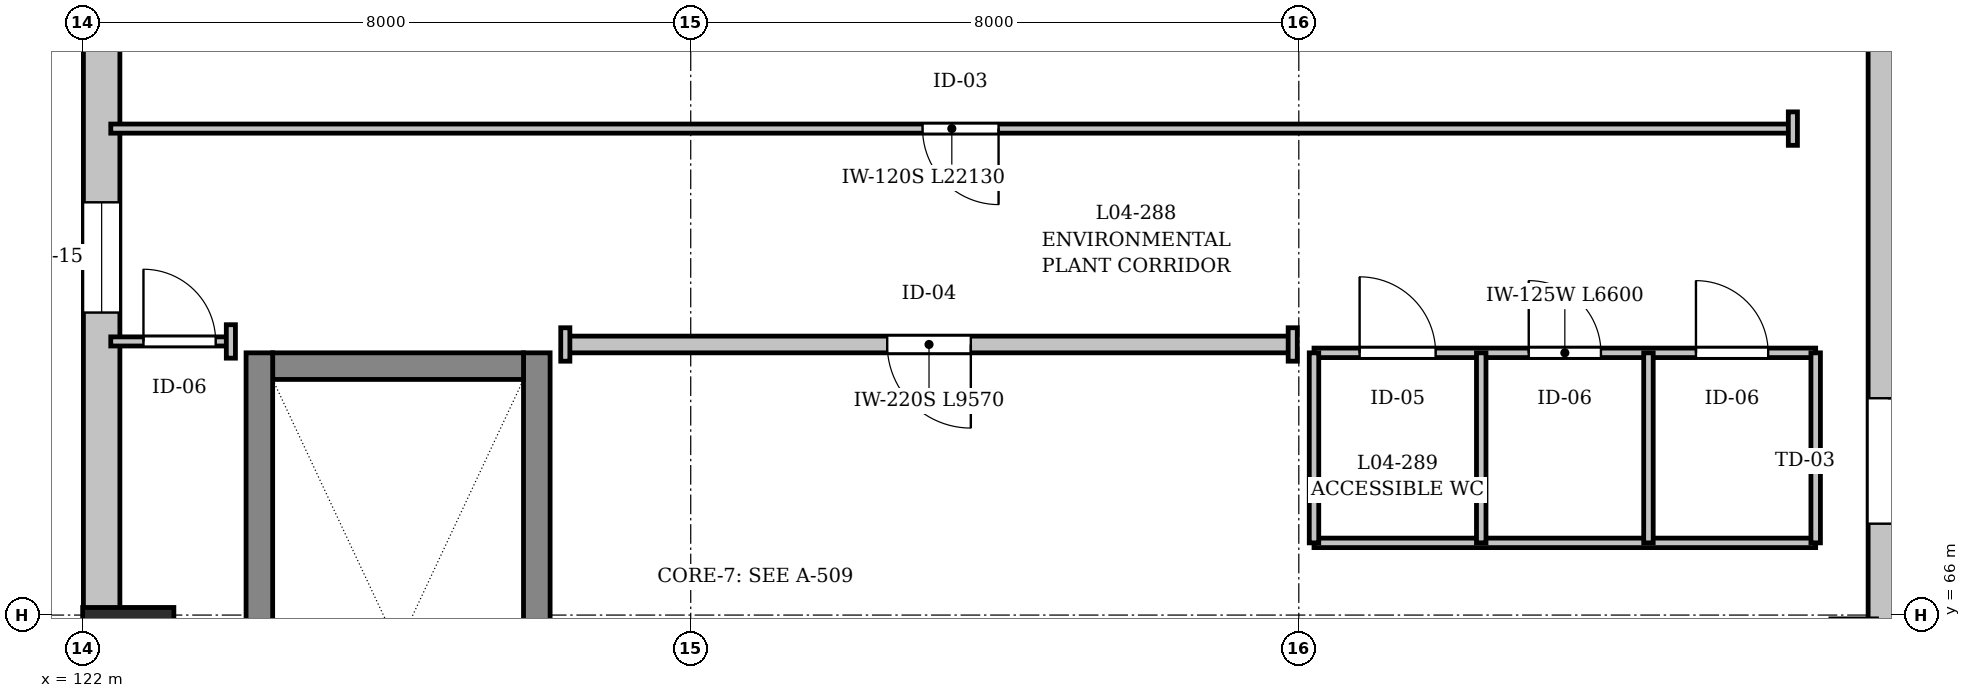
"""IFC4 building model, lengths in metres.
Left out: names, types, materials, properties, quantities, classifications, styles, units other than length and angle.
Written with IfcOpenShell. Run it as: python <this file> out.ifc"""

import sys

from ifc_helpers import new_model, si_unit, direction, frame, frame_2d, origin, origin_2d, place, context, subcontext, project, spatial, rectangle, extrude, element, fill, save


model = new_model("IFC4")
c1 = context("Model", 3, precision=1e-05, world=origin(), true_north=direction((0.0, 1.0)))
c2 = subcontext(c1, "Body", "Model", "MODEL_VIEW")
j1 = project(units=[si_unit("LENGTHUNIT", "METRE"), si_unit("PLANEANGLEUNIT", "RADIAN")], contexts=[c1])
p1 = place(None, origin())
s1 = spatial("IfcSite", under=j1, at=p1, CompositionType="ELEMENT")
p2 = place(p1, origin())
s2 = spatial("IfcBuilding", under=s1, at=p2, CompositionType="ELEMENT")
p3 = place(p2, frame((0.0, 0.0, 15.0)))
s3 = spatial("IfcBuildingStorey", under=s2, at=p3, CompositionType="ELEMENT", Elevation=15.0)
p4 = place(p3, frame((122.6, 65.5, 0.0), z_axis=(0.0, 0.0, 1.0), x_axis=(1.0, 0.0, 0.0)))
e1 = element("IfcColumn", 1, at=p4, inside=s3, PredefinedType="COLUMN", context=c2, shape_type="SweptSolid", body=[
    extrude(rectangle(XDim=1.2, YDim=1.2, at=origin_2d()), origin(), (0.0, 0.0, 1.0), 4.54),
])
p5 = place(p3, frame((122.25, 66.07, 0.0), z_axis=(0.0, 0.0, 1.0), x_axis=(0.0, 1.0, 0.0)))
e2 = element("IfcWall", 2, at=p5, inside=s3, PredefinedType="SOLIDWALL", context=c2, shape_type="SweptSolid", body=[
    extrude(rectangle(XDim=7.71, YDim=0.48, at=frame_2d((3.855, 0.0))), origin(), (0.0, 0.0, 1.0), 4.54),
])
p6 = place(p5, frame((3.91, 0.0, 0.9)))
e3 = element("IfcOpeningElement", 3, at=p6, cuts=e2, PredefinedType="OPENING", context=c2, shape_type="SweptSolid", body=[
    extrude(rectangle(XDim=1.45, YDim=1.5, at=frame_2d((0.725, 0.75))), frame((0.0, 0.25, 0.0), z_axis=(0.0, -1.0, 0.0), x_axis=(1.0, 0.0, 0.0)), (0.0, 0.0, 1.0), 0.5),
])
p7 = place(p3, frame((145.75, 74.75, 0.0), z_axis=(0.0, 0.0, 1.0), x_axis=(0.0, -1.0, 0.0)))
e4 = element("IfcWall", 4, at=p7, inside=s3, PredefinedType="SOLIDWALL", context=c2, shape_type="SweptSolid", body=[
    extrude(rectangle(XDim=18.5, YDim=0.52, at=frame_2d((9.25, 0.0))), origin(), (0.0, 0.0, 1.0), 4.54),
])
p8 = place(p7, frame((5.897, 0.0, 0.0)))
e5 = element("IfcOpeningElement", 5, at=p8, cuts=e4, PredefinedType="OPENING", context=c2, shape_type="SweptSolid", body=[
    extrude(rectangle(XDim=1.65, YDim=2.4, at=frame_2d((0.825, 1.2))), frame((0.0, 0.27, 0.0), z_axis=(0.0, -1.0, 0.0), x_axis=(1.0, 0.0, 0.0)), (0.0, 0.0, 1.0), 0.54),
])
p9 = place(p3, frame((127.975, 60.15, 0.0), z_axis=(0.0, 0.0, 1.0), x_axis=(0.0, 1.0, 0.0)))
e6 = element("IfcWall", 6, at=p9, inside=s3, PredefinedType="SHEAR", context=c2, shape_type="SweptSolid", body=[
    extrude(rectangle(XDim=9.3, YDim=0.35, at=frame_2d((4.65, 0.0))), origin(), (0.0, 0.0, 1.0), 3.6),
])
p10 = place(p3, frame((127.8, 69.275, 0.0), z_axis=(0.0, 0.0, 1.0), x_axis=(-1.0, 0.0, 0.0)))
e7 = element("IfcWall", 7, at=p10, inside=s3, PredefinedType="SHEAR", context=c2, shape_type="SweptSolid", body=[
    extrude(rectangle(XDim=3.3, YDim=0.35, at=frame_2d((1.65, 0.0))), origin(), (0.0, 0.0, 1.0), 3.6),
])
p11 = place(p3, frame((124.325, 69.45, 0.0), z_axis=(0.0, 0.0, 1.0), x_axis=(0.0, -1.0, 0.0)))
e8 = element("IfcWall", 8, at=p11, inside=s3, PredefinedType="SHEAR", context=c2, shape_type="SweptSolid", body=[
    extrude(rectangle(XDim=9.3, YDim=0.35, at=frame_2d((4.65, 0.0))), origin(), (0.0, 0.0, 1.0), 3.6),
])
p12 = place(p3, frame((138.2, 69.45, 0.0), z_axis=(0.0, 0.0, 1.0), x_axis=(1.0, 0.0, 0.0)))
e9 = element("IfcWall", 9, at=p12, inside=s3, PredefinedType="PARTITIONING", context=c2, shape_type="SweptSolid", body=[
    extrude(rectangle(XDim=6.6, YDim=0.125, at=frame_2d((3.3, 0.0))), origin(), (0.0, 0.0, 1.0), 3.55),
])
p13 = place(p12, frame((0.6, 0.0, 0.0)))
e10 = element("IfcOpeningElement", 10, at=p13, cuts=e9, PredefinedType="OPENING", context=c2, shape_type="SweptSolid", body=[
    extrude(rectangle(XDim=1.0, YDim=2.2, at=frame_2d((0.5, 1.1))), frame((0.0, 0.073, 0.0), z_axis=(0.0, -1.0, 0.0), x_axis=(1.0, 0.0, 0.0)), (0.0, 0.0, 1.0), 0.145),
])
p14 = place(p12, frame((2.825, 0.0, 0.0)))
e11 = element("IfcOpeningElement", 11, at=p14, cuts=e9, PredefinedType="OPENING", context=c2, shape_type="SweptSolid", body=[
    extrude(rectangle(XDim=0.95, YDim=2.2, at=frame_2d((0.475, 1.1))), frame((0.0, 0.073, 0.0), z_axis=(0.0, -1.0, 0.0), x_axis=(1.0, 0.0, 0.0)), (0.0, 0.0, 1.0), 0.145),
])
p15 = place(p12, frame((5.025, 0.0, 0.0)))
e12 = element("IfcOpeningElement", 12, at=p15, cuts=e9, PredefinedType="OPENING", context=c2, shape_type="SweptSolid", body=[
    extrude(rectangle(XDim=0.95, YDim=2.2, at=frame_2d((0.475, 1.1))), frame((0.0, 0.073, 0.0), z_axis=(0.0, -1.0, 0.0), x_axis=(1.0, 0.0, 0.0)), (0.0, 0.0, 1.0), 0.145),
])
p16 = place(p3, frame((138.2, 66.95, 0.0), z_axis=(0.0, 0.0, 1.0), x_axis=(1.0, 0.0, 0.0)))
e13 = element("IfcWall", 13, at=p16, inside=s3, PredefinedType="PARTITIONING", context=c2, shape_type="SweptSolid", body=[
    extrude(rectangle(XDim=6.6, YDim=0.125, at=frame_2d((3.3, 0.0))), origin(), (0.0, 0.0, 1.0), 3.55),
])
for number, where, z_axis, x_axis in (
    (14, (138.2, 66.95, 0.0), (0.0, 0.0, 1.0), (0.0, 1.0, 0.0)),
    (15, (144.8, 66.95, 0.0), (0.0, 0.0, 1.0), (0.0, 1.0, 0.0)),
    (16, (140.4, 66.95, 0.0), (0.0, 0.0, 1.0), (0.0, 1.0, 0.0)),
    (17, (142.6, 66.95, 0.0), (0.0, 0.0, 1.0), (0.0, 1.0, 0.0)),
):
    element("IfcWall", number, at=place(p3, frame(where, z_axis=z_axis, x_axis=x_axis)), inside=s3, PredefinedType="PARTITIONING", context=c2, shape_type="SweptSolid", body=[
        extrude(rectangle(XDim=2.5, YDim=0.125, at=frame_2d((1.25, 0.0))), origin(), (0.0, 0.0, 1.0), 3.55),
    ])
p17 = place(p3, frame((144.5, 72.4, 0.0), z_axis=(0.0, 0.0, 1.0), x_axis=(-1.0, 0.0, 0.0)))
e18 = element("IfcWall", 18, at=p17, inside=s3, PredefinedType="PARTITIONING", context=c2, shape_type="SweptSolid", body=[
    extrude(rectangle(XDim=22.13, YDim=0.12, at=frame_2d((11.065, 0.0))), origin(), (0.0, 0.0, 1.0), 3.55),
])
p18 = place(p17, frame((10.45, 0.0, 0.0)))
e19 = element("IfcOpeningElement", 19, at=p18, cuts=e18, PredefinedType="OPENING", context=c2, shape_type="SweptSolid", body=[
    extrude(rectangle(XDim=1.0, YDim=2.2, at=frame_2d((0.5, 1.1))), frame((0.0, 0.07, 0.0), z_axis=(0.0, -1.0, 0.0), x_axis=(1.0, 0.0, 0.0)), (0.0, 0.0, 1.0), 0.14),
])
p19 = place(p3, frame((122.37, 69.6, 0.0), z_axis=(0.0, 0.0, 1.0), x_axis=(1.0, 0.0, 0.0)))
e20 = element("IfcWall", 20, at=p19, inside=s3, PredefinedType="PARTITIONING", context=c2, shape_type="SweptSolid", body=[
    extrude(rectangle(XDim=1.58, YDim=0.12, at=frame_2d((0.79, 0.0))), origin(), (0.0, 0.0, 1.0), 3.55),
])
p20 = place(p19, frame((0.43, 0.0, 0.0)))
e21 = element("IfcOpeningElement", 21, at=p20, cuts=e20, PredefinedType="OPENING", context=c2, shape_type="SweptSolid", body=[
    extrude(rectangle(XDim=0.95, YDim=2.2, at=frame_2d((0.475, 1.1))), frame((0.0, 0.07, 0.0), z_axis=(0.0, -1.0, 0.0), x_axis=(1.0, 0.0, 0.0)), (0.0, 0.0, 1.0), 0.14),
])
p21 = place(p3, frame((137.92, 69.56, 0.0), z_axis=(0.0, 0.0, 1.0), x_axis=(-1.0, 0.0, 0.0)))
e22 = element("IfcWall", 22, at=p21, inside=s3, PredefinedType="SOLIDWALL", context=c2, shape_type="SweptSolid", body=[
    extrude(rectangle(XDim=9.57, YDim=0.22, at=frame_2d((4.785, 0.0))), origin(), (0.0, 0.0, 1.0), 3.55),
])
p22 = place(p21, frame((4.235, 0.0, 0.0)))
e23 = element("IfcOpeningElement", 23, at=p22, cuts=e22, PredefinedType="OPENING", context=c2, shape_type="SweptSolid", body=[
    extrude(rectangle(XDim=1.1, YDim=2.2, at=frame_2d((0.55, 1.1))), frame((0.0, 0.12, 0.0), z_axis=(0.0, -1.0, 0.0), x_axis=(1.0, 0.0, 0.0)), (0.0, 0.0, 1.0), 0.24),
])
for number, where, z_axis, x_axis in (
    (24, (144.5, 72.62, 0.0), (0.0, 0.0, 1.0), (0.0, -1.0, 0.0)),
    (25, (123.95, 69.38, 0.0), (0.0, 0.0, 1.0), (0.0, 1.0, 0.0)),
):
    element("IfcWall", number, at=place(p3, frame(where, z_axis=z_axis, x_axis=x_axis)), inside=s3, PredefinedType="PARTITIONING", context=c2, shape_type="SweptSolid", body=[
        extrude(rectangle(XDim=0.44, YDim=0.12, at=frame_2d((0.22, 0.0))), origin(), (0.0, 0.0, 1.0), 3.55),
    ])
for number, where, z_axis, x_axis in (
    (26, (137.92, 69.78, 0.0), (0.0, 0.0, 1.0), (0.0, -1.0, 0.0)),
    (27, (128.35, 69.78, 0.0), (0.0, 0.0, 1.0), (0.0, -1.0, 0.0)),
):
    element("IfcWall", number, at=place(p3, frame(where, z_axis=z_axis, x_axis=x_axis)), inside=s3, PredefinedType="PARTITIONING", context=c2, shape_type="SweptSolid", body=[
        extrude(rectangle(XDim=0.44, YDim=0.12, at=frame_2d((0.22, 0.0))), origin(), (0.0, 0.0, 1.0), 3.55),
    ])
p23 = place(p6, origin())
e28 = element("IfcWindow", 28, at=p23, inside=s3, PartitioningType="DOUBLE_PANEL_VERTICAL", PredefinedType="WINDOW", context=c2, shape_type="SweptSolid", body=[
    extrude(rectangle(XDim=1.45, YDim=1.5, at=frame_2d((0.725, 0.75))), frame((0.0, 0.03, 0.0), z_axis=(0.0, -1.0, 0.0), x_axis=(1.0, 0.0, 0.0)), (0.0, 0.0, 1.0), 0.06),
])
fill(e3, e28)
p24 = place(p8, origin())
e29 = element("IfcDoor", 29, at=p24, inside=s3, OperationType="DOUBLE_DOOR_SINGLE_SWING", PredefinedType="DOOR", context=c2, shape_type="SweptSolid", body=[
    extrude(rectangle(XDim=1.65, YDim=2.4, at=frame_2d((0.825, 1.2))), frame((0.0, 0.025, 0.0), z_axis=(0.0, -1.0, 0.0), x_axis=(1.0, 0.0, 0.0)), (0.0, 0.0, 1.0), 0.05),
])
fill(e5, e29)
p25 = place(p13, origin())
e30 = element("IfcDoor", 30, at=p25, inside=s3, OperationType="SINGLE_SWING_LEFT", PredefinedType="DOOR", context=c2, shape_type="SweptSolid", body=[
    extrude(rectangle(XDim=1.0, YDim=2.2, at=frame_2d((0.5, 1.1))), frame((0.0, 0.025, 0.0), z_axis=(0.0, -1.0, 0.0), x_axis=(1.0, 0.0, 0.0)), (0.0, 0.0, 1.0), 0.05),
])
fill(e10, e30)
p26 = place(p14, origin())
e31 = element("IfcDoor", 31, at=p26, inside=s3, OperationType="SINGLE_SWING_RIGHT", PredefinedType="DOOR", context=c2, shape_type="SweptSolid", body=[
    extrude(rectangle(XDim=0.95, YDim=2.2, at=frame_2d((0.475, 1.1))), frame((0.0, 0.025, 0.0), z_axis=(0.0, -1.0, 0.0), x_axis=(1.0, 0.0, 0.0)), (0.0, 0.0, 1.0), 0.05),
])
fill(e11, e31)
p27 = place(p15, origin())
e32 = element("IfcDoor", 32, at=p27, inside=s3, OperationType="SINGLE_SWING_LEFT", PredefinedType="DOOR", context=c2, shape_type="SweptSolid", body=[
    extrude(rectangle(XDim=0.95, YDim=2.2, at=frame_2d((0.475, 1.1))), frame((0.0, 0.025, 0.0), z_axis=(0.0, -1.0, 0.0), x_axis=(1.0, 0.0, 0.0)), (0.0, 0.0, 1.0), 0.05),
])
fill(e12, e32)
p28 = place(p18, origin())
e33 = element("IfcDoor", 33, at=p28, inside=s3, OperationType="SINGLE_SWING_RIGHT", PredefinedType="DOOR", context=c2, shape_type="SweptSolid", body=[
    extrude(rectangle(XDim=1.0, YDim=2.2, at=frame_2d((0.5, 1.1))), frame((0.0, 0.025, 0.0), z_axis=(0.0, -1.0, 0.0), x_axis=(1.0, 0.0, 0.0)), (0.0, 0.0, 1.0), 0.05),
])
fill(e19, e33)
p29 = place(p20, origin())
e34 = element("IfcDoor", 34, at=p29, inside=s3, OperationType="SINGLE_SWING_LEFT", PredefinedType="DOOR", context=c2, shape_type="SweptSolid", body=[
    extrude(rectangle(XDim=0.95, YDim=2.2, at=frame_2d((0.475, 1.1))), frame((0.0, 0.025, 0.0), z_axis=(0.0, -1.0, 0.0), x_axis=(1.0, 0.0, 0.0)), (0.0, 0.0, 1.0), 0.05),
])
fill(e21, e34)
p30 = place(p22, origin())
e35 = element("IfcDoor", 35, at=p30, inside=s3, OperationType="SINGLE_SWING_RIGHT", PredefinedType="DOOR", context=c2, shape_type="SweptSolid", body=[
    extrude(rectangle(XDim=1.1, YDim=2.2, at=frame_2d((0.55, 1.1))), frame((0.0, 0.025, 0.0), z_axis=(0.0, -1.0, 0.0), x_axis=(1.0, 0.0, 0.0)), (0.0, 0.0, 1.0), 0.05),
])
fill(e23, e35)
save(model, sys.argv[1])
